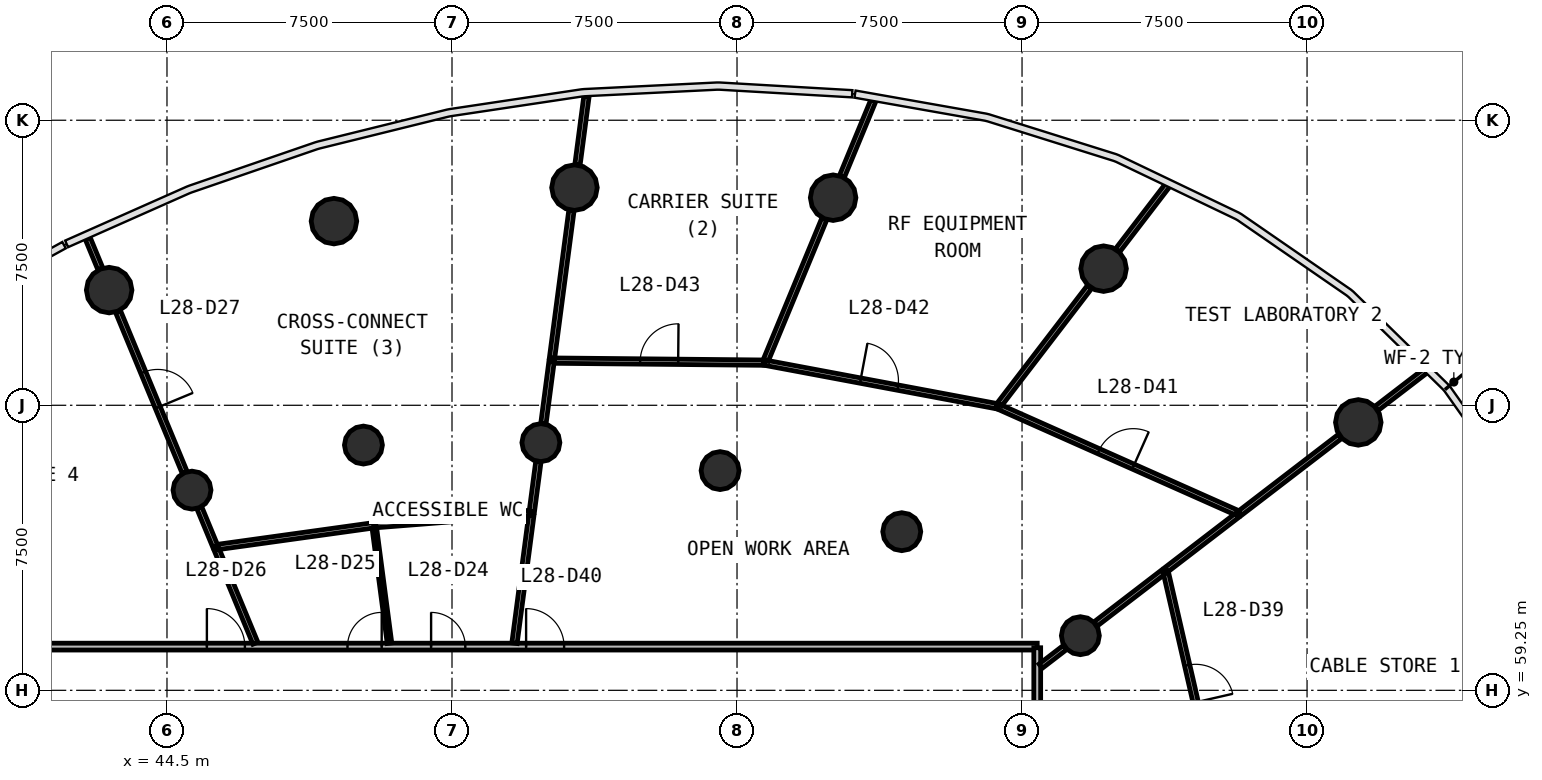
"""IFC4 building model, lengths in metres.
Left out: names, types, materials, properties, quantities, classifications, styles, units other than length and angle.
Written with IfcOpenShell. Run it as: python <this file> out.ifc"""

import sys

from ifc_helpers import new_model, si_unit, direction, frame, frame_2d, origin, origin_2d, place, context, subcontext, project, spatial, rectangle, circle, extrude, source, transform, mapped, element, fill, save


model = new_model("IFC4")
c1 = context("Model", 3, precision=1e-05, world=origin(), true_north=direction((0.0, 1.0)))
c2 = subcontext(c1, "Body", "Model", "MODEL_VIEW")
j1 = project(units=[si_unit("LENGTHUNIT", "METRE"), si_unit("PLANEANGLEUNIT", "RADIAN")], contexts=[c1])
p1 = place(None, origin())
s1 = spatial("IfcSite", under=j1, at=p1, CompositionType="ELEMENT")
p2 = place(p1, origin())
s2 = spatial("IfcBuilding", under=s1, at=p2, CompositionType="ELEMENT")
p3 = place(p2, frame((0.0, 0.0, 120.8)))
s3 = spatial("IfcBuildingStorey", under=s2, at=p3, CompositionType="ELEMENT", Elevation=120.8)
m1 = source(origin(), c2, "Body", "SweptSolid", [
    extrude(circle(Radius=0.6, at=origin_2d()), origin(), (0.0, 0.0, 1.0), 4.1),
])
for number, where, z_axis, x_axis in (
    (1, (75.848, 66.299, 0.0), (0.0, 0.0, 1.0), (1.0, 0.0, 0.0)),
    (2, (69.146, 70.345, 0.0), (0.0, 0.0, 1.0), (1.0, 0.0, 0.0)),
    (3, (62.029, 72.212, 0.0), (0.0, 0.0, 1.0), (1.0, 0.0, 0.0)),
    (4, (55.222, 72.477, 0.0), (0.0, 0.0, 1.0), (1.0, 0.0, 0.0)),
    (5, (48.894, 71.595, 0.0), (0.0, 0.0, 1.0), (1.0, 0.0, 0.0)),
    (6, (42.978, 69.781, 0.0), (0.0, 0.0, 1.0), (1.0, 0.0, 0.0)),
):
    element("IfcColumn", number, at=place(p3, frame(where, z_axis=z_axis, x_axis=x_axis)), inside=s3, PredefinedType="COLUMN", context=c2, shape_type="MappedRepresentation", body=[
        mapped(m1, transform((0.0, 0.0, 0.0), scale=1.0)),
    ])
m2 = source(origin(), c2, "Body", "SweptSolid", [
    extrude(circle(Radius=0.5, at=origin_2d()), origin(), (0.0, 0.0, 1.0), 4.1),
])
for number, where, z_axis, x_axis in (
    (7, (68.535, 60.688, 0.0), (0.0, 0.0, 1.0), (1.0, 0.0, 0.0)),
    (8, (63.835, 63.424, 0.0), (0.0, 0.0, 1.0), (1.0, 0.0, 0.0)),
    (9, (59.055, 65.031, 0.0), (0.0, 0.0, 1.0), (1.0, 0.0, 0.0)),
    (10, (54.339, 65.767, 0.0), (0.0, 0.0, 1.0), (1.0, 0.0, 0.0)),
    (11, (49.669, 65.703, 0.0), (0.0, 0.0, 1.0), (1.0, 0.0, 0.0)),
    (12, (45.158, 64.518, 0.0), (0.0, 0.0, 1.0), (1.0, 0.0, 0.0)),
):
    element("IfcColumn", number, at=place(p3, frame(where, z_axis=z_axis, x_axis=x_axis)), inside=s3, PredefinedType="COLUMN", context=c2, shape_type="MappedRepresentation", body=[
        mapped(m2, transform((0.0, 0.0, 0.0), scale=1.0)),
    ])
p4 = place(p3, frame((36.6, 60.4, 0.0), z_axis=(0.0, 0.0, 1.0), x_axis=(1.0, 0.0, 0.0)))
e13 = element("IfcWall", 13, at=p4, inside=s3, PredefinedType="PARTITIONING", context=c2, shape_type="SweptSolid", body=[
    extrude(rectangle(XDim=30.8, YDim=0.18, at=frame_2d((15.4, 0.0))), origin(), (0.0, 0.0, 1.0), 2.9),
])
p5 = place(p4, frame((14.85, 0.0, 0.0)))
e14 = element("IfcOpeningElement", 14, at=p5, cuts=e13, PredefinedType="OPENING", context=c2, shape_type="SweptSolid", body=[
    extrude(rectangle(XDim=0.9, YDim=2.1, at=frame_2d((0.45, 1.05))), frame((0.0, 0.1, 0.0), z_axis=(0.0, -1.0, 0.0), x_axis=(1.0, 0.0, 0.0)), (0.0, 0.0, 1.0), 0.2),
])
p6 = place(p4, frame((12.65, 0.0, 0.0)))
e15 = element("IfcOpeningElement", 15, at=p6, cuts=e13, PredefinedType="OPENING", context=c2, shape_type="SweptSolid", body=[
    extrude(rectangle(XDim=0.9, YDim=2.1, at=frame_2d((0.45, 1.05))), frame((0.0, 0.1, 0.0), z_axis=(0.0, -1.0, 0.0), x_axis=(1.0, 0.0, 0.0)), (0.0, 0.0, 1.0), 0.2),
])
p7 = place(p4, frame((8.95, 0.0, 0.0)))
e16 = element("IfcOpeningElement", 16, at=p7, cuts=e13, PredefinedType="OPENING", context=c2, shape_type="SweptSolid", body=[
    extrude(rectangle(XDim=1.0, YDim=2.1, at=frame_2d((0.5, 1.05))), frame((0.0, 0.1, 0.0), z_axis=(0.0, -1.0, 0.0), x_axis=(1.0, 0.0, 0.0)), (0.0, 0.0, 1.0), 0.2),
])
p8 = place(p4, frame((17.35, 0.0, 0.0)))
e17 = element("IfcOpeningElement", 17, at=p8, cuts=e13, PredefinedType="OPENING", context=c2, shape_type="SweptSolid", body=[
    extrude(rectangle(XDim=1.0, YDim=2.1, at=frame_2d((0.5, 1.05))), frame((0.0, 0.1, 0.0), z_axis=(0.0, -1.0, 0.0), x_axis=(1.0, 0.0, 0.0)), (0.0, 0.0, 1.0), 0.2),
])
p9 = place(p3, frame((67.4, 60.37, 0.0), z_axis=(0.0, 0.0, 1.0), x_axis=(0.0, -1.0, 0.0)))
e18 = element("IfcWall", 18, at=p9, inside=s3, PredefinedType="PARTITIONING", context=c2, shape_type="SweptSolid", body=[
    extrude(rectangle(XDim=23.583, YDim=0.18, at=frame_2d((11.791, 0.0))), origin(), (0.0, 0.0, 1.0), 2.9),
])
p10 = place(p9, frame((11.333, 0.0, 0.0)))
e19 = element("IfcOpeningElement", 19, at=p10, cuts=e18, PredefinedType="OPENING", context=c2, shape_type="SweptSolid", body=[
    extrude(rectangle(XDim=1.0, YDim=2.1, at=frame_2d((0.5, 1.05))), frame((0.0, 0.1, 0.0), z_axis=(0.0, -1.0, 0.0), x_axis=(1.0, 0.0, 0.0)), (0.0, 0.0, 1.0), 0.2),
])
p11 = place(p9, frame((9.133, 0.0, 0.0)))
e20 = element("IfcOpeningElement", 20, at=p11, cuts=e18, PredefinedType="OPENING", context=c2, shape_type="SweptSolid", body=[
    extrude(rectangle(XDim=1.0, YDim=2.1, at=frame_2d((0.5, 1.05))), frame((0.0, 0.1, 0.0), z_axis=(0.0, -1.0, 0.0), x_axis=(1.0, 0.0, 0.0)), (0.0, 0.0, 1.0), 0.2),
])
p12 = place(p3, frame((66.365, 66.721, 0.0), z_axis=(0.0, 0.0, 1.0), x_axis=(0.913647797107, -0.406506707006, 0.0)))
e21 = element("IfcWall", 21, at=p12, inside=s3, PredefinedType="PARTITIONING", context=c2, shape_type="SweptSolid", body=[
    extrude(rectangle(XDim=6.95, YDim=0.14, at=frame_2d((3.475, 0.0))), origin(), (0.0, 0.0, 1.0), 2.9),
])
p13 = place(p12, frame((2.9, 0.0, 0.0)))
e22 = element("IfcOpeningElement", 22, at=p13, cuts=e21, PredefinedType="OPENING", context=c2, shape_type="SweptSolid", body=[
    extrude(rectangle(XDim=1.0, YDim=2.1, at=frame_2d((0.5, 1.05))), frame((0.0, 0.08, 0.0), z_axis=(0.0, -1.0, 0.0), x_axis=(1.0, 0.0, 0.0)), (0.0, 0.0, 1.0), 0.16),
])
p14 = place(p3, frame((60.231, 67.872, 0.0), z_axis=(0.0, 0.0, 1.0), x_axis=(0.982845477165, -0.184430930205, 0.0)))
e23 = element("IfcWall", 23, at=p14, inside=s3, PredefinedType="PARTITIONING", context=c2, shape_type="SweptSolid", body=[
    extrude(rectangle(XDim=6.211, YDim=0.14, at=frame_2d((3.105, 0.0))), origin(), (0.0, 0.0, 1.0), 2.9),
])
p15 = place(p14, frame((2.561, 0.0, 0.0)))
e24 = element("IfcOpeningElement", 24, at=p15, cuts=e23, PredefinedType="OPENING", context=c2, shape_type="SweptSolid", body=[
    extrude(rectangle(XDim=1.0, YDim=2.1, at=frame_2d((0.5, 1.05))), frame((0.0, 0.08, 0.0), z_axis=(0.0, -1.0, 0.0), x_axis=(1.0, 0.0, 0.0)), (0.0, 0.0, 1.0), 0.16),
])
p16 = place(p3, frame((70.772, 62.404, 0.0), z_axis=(0.0, 0.0, 1.0), x_axis=(0.223963615519, -0.974597506114, 0.0)))
e25 = element("IfcWall", 25, at=p16, inside=s3, PredefinedType="PARTITIONING", context=c2, shape_type="SweptSolid", body=[
    extrude(rectangle(XDim=6.21, YDim=0.14, at=frame_2d((3.105, 0.0))), origin(), (0.0, 0.0, 1.0), 2.9),
])
p17 = place(p16, frame((2.56, 0.0, 0.0)))
e26 = element("IfcOpeningElement", 26, at=p17, cuts=e25, PredefinedType="OPENING", context=c2, shape_type="SweptSolid", body=[
    extrude(rectangle(XDim=1.0, YDim=2.1, at=frame_2d((0.5, 1.05))), frame((0.0, 0.08, 0.0), z_axis=(0.0, -1.0, 0.0), x_axis=(1.0, 0.0, 0.0)), (0.0, 0.0, 1.0), 0.16),
])
p18 = place(p3, frame((54.623, 67.925, 0.0), z_axis=(0.0, 0.0, 1.0), x_axis=(0.999954062226, -0.009585063231, 0.0)))
e27 = element("IfcWall", 27, at=p18, inside=s3, PredefinedType="PARTITIONING", context=c2, shape_type="SweptSolid", body=[
    extrude(rectangle(XDim=5.578, YDim=0.14, at=frame_2d((2.789, 0.0))), origin(), (0.0, 0.0, 1.0), 2.9),
])
p19 = place(p18, frame((2.328, 0.0, 0.0)))
e28 = element("IfcOpeningElement", 28, at=p19, cuts=e27, PredefinedType="OPENING", context=c2, shape_type="SweptSolid", body=[
    extrude(rectangle(XDim=1.0, YDim=2.1, at=frame_2d((0.5, 1.05))), frame((0.0, 0.08, 0.0), z_axis=(0.0, -1.0, 0.0), x_axis=(1.0, 0.0, 0.0)), (0.0, 0.0, 1.0), 0.16),
])
p20 = place(p3, frame((43.21, 69.222, 0.0), z_axis=(0.0, 0.0, 1.0), x_axis=(0.382705930348, -0.923870213221, 0.0)))
e29 = element("IfcWall", 29, at=p20, inside=s3, PredefinedType="PARTITIONING", context=c2, shape_type="SweptSolid", body=[
    extrude(rectangle(XDim=4.587, YDim=0.14, at=frame_2d((2.293, 0.0))), origin(), (0.0, 0.0, 1.0), 2.9),
])
p21 = place(p20, frame((1.737, 0.0, 0.0)))
e30 = element("IfcOpeningElement", 30, at=p21, cuts=e29, PredefinedType="OPENING", context=c2, shape_type="SweptSolid", body=[
    extrude(rectangle(XDim=1.0, YDim=2.1, at=frame_2d((0.5, 1.05))), frame((0.0, 0.08, 0.0), z_axis=(0.0, -1.0, 0.0), x_axis=(1.0, 0.0, 0.0)), (0.0, 0.0, 1.0), 0.16),
])
p22 = place(p3, frame((49.947, 63.593, 0.0), z_axis=(0.0, 0.0, 1.0), x_axis=(-0.990459508441, -0.137804071561, 0.0)))
e31 = element("IfcWall", 31, at=p22, inside=s3, PredefinedType="PARTITIONING", context=c2, shape_type="SweptSolid", body=[
    extrude(rectangle(XDim=4.206, YDim=0.14, at=frame_2d((2.103, 0.0))), origin(), (0.0, 0.0, 1.0), 2.9),
])
p23 = place(p3, frame((54.096, 63.92, 0.0), z_axis=(0.0, 0.0, 1.0), x_axis=(-0.996907048468, -0.078589673076, 0.0)))
e32 = element("IfcWall", 32, at=p23, inside=s3, PredefinedType="PARTITIONING", context=c2, shape_type="SweptSolid", body=[
    extrude(rectangle(XDim=4.132, YDim=0.14, at=frame_2d((2.066, 0.0))), origin(), (0.0, 0.0, 1.0), 2.9),
])
p24 = place(p3, frame((60.258, 67.938, 0.0), z_axis=(0.0, 0.0, 1.0), x_axis=(0.382718123952, 0.923865162022, 0.0)))
e33 = element("IfcWall", 33, at=p24, inside=s3, PredefinedType="PARTITIONING", context=c2, shape_type="SweptSolid", body=[
    extrude(rectangle(XDim=4.022, YDim=0.14, at=frame_2d((2.011, 0.0))), origin(), (0.0, 0.0, 1.0), 2.9),
])
p25 = place(p3, frame((54.632, 67.995, 0.0), z_axis=(0.0, 0.0, 1.0), x_axis=(0.130554504695, 0.991441133554, 0.0)))
e34 = element("IfcWall", 34, at=p25, inside=s3, PredefinedType="PARTITIONING", context=c2, shape_type="SweptSolid", body=[
    extrude(rectangle(XDim=3.916, YDim=0.14, at=frame_2d((1.958, 0.0))), origin(), (0.0, 0.0, 1.0), 2.9),
])
p26 = place(p3, frame((66.409, 66.778, 0.0), z_axis=(0.0, 0.0, 1.0), x_axis=(0.608715955057, 0.793388231611, 0.0)))
e35 = element("IfcWall", 35, at=p26, inside=s3, PredefinedType="PARTITIONING", context=c2, shape_type="SweptSolid", body=[
    extrude(rectangle(XDim=3.892, YDim=0.14, at=frame_2d((1.946, 0.0))), origin(), (0.0, 0.0, 1.0), 2.9),
])
p27 = place(p3, frame((53.644, 60.49, 0.0), z_axis=(0.0, 0.0, 1.0), x_axis=(0.130568214448, 0.991439328137, 0.0)))
e36 = element("IfcWall", 36, at=p27, inside=s3, PredefinedType="PARTITIONING", context=c2, shape_type="SweptSolid", body=[
    extrude(rectangle(XDim=3.388, YDim=0.14, at=frame_2d((1.694, 0.0))), origin(), (0.0, 0.0, 1.0), 2.9),
])
p28 = place(p3, frame((72.739, 63.914, 0.0), z_axis=(0.0, 0.0, 1.0), x_axis=(0.793376329811, 0.608731467312, 0.0)))
e37 = element("IfcWall", 37, at=p28, inside=s3, PredefinedType="PARTITIONING", context=c2, shape_type="SweptSolid", body=[
    extrude(rectangle(XDim=3.315, YDim=0.14, at=frame_2d((1.657, 0.0))), origin(), (0.0, 0.0, 1.0), 2.9),
])
p29 = place(p3, frame((46.826, 60.49, 0.0), z_axis=(0.0, 0.0, 1.0), x_axis=(-0.382665323853, 0.923887033094, 0.0)))
e38 = element("IfcWall", 38, at=p29, inside=s3, PredefinedType="PARTITIONING", context=c2, shape_type="SweptSolid", body=[
    extrude(rectangle(XDim=2.659, YDim=0.14, at=frame_2d((1.33, 0.0))), origin(), (0.0, 0.0, 1.0), 2.9),
])
p30 = place(p3, frame((70.796, 62.422, 0.0), z_axis=(0.0, 0.0, 1.0), x_axis=(0.79335268966, 0.608762276927, 0.0)))
e39 = element("IfcWall", 39, at=p30, inside=s3, PredefinedType="PARTITIONING", context=c2, shape_type="SweptSolid", body=[
    extrude(rectangle(XDim=2.34, YDim=0.14, at=frame_2d((1.17, 0.0))), origin(), (0.0, 0.0, 1.0), 2.9),
])
p31 = place(p3, frame((68.935, 60.995, 0.0), z_axis=(0.0, 0.0, 1.0), x_axis=(0.793288498534, 0.608845923115, 0.0)))
e40 = element("IfcWall", 40, at=p31, inside=s3, PredefinedType="PARTITIONING", context=c2, shape_type="SweptSolid", body=[
    extrude(rectangle(XDim=2.238, YDim=0.14, at=frame_2d((1.119, 0.0))), origin(), (0.0, 0.0, 1.0), 2.9),
])
p32 = place(p3, frame((69.514, 70.824, 0.0), z_axis=(0.0, 0.0, 1.0), x_axis=(0.608790940556, 0.793330694412, 0.0)))
e41 = element("IfcWall", 41, at=p32, inside=s3, PredefinedType="PARTITIONING", context=c2, shape_type="SweptSolid", body=[
    extrude(rectangle(XDim=2.182, YDim=0.14, at=frame_2d((1.091, 0.0))), origin(), (0.0, 0.0, 1.0), 2.9),
])
p33 = place(p3, frame((62.26, 72.771, 0.0), z_axis=(0.0, 0.0, 1.0), x_axis=(0.38271416586, 0.923866801682, 0.0)))
e42 = element("IfcWall", 42, at=p33, inside=s3, PredefinedType="PARTITIONING", context=c2, shape_type="SweptSolid", body=[
    extrude(rectangle(XDim=2.162, YDim=0.14, at=frame_2d((1.081, 0.0))), origin(), (0.0, 0.0, 1.0), 2.9),
])
p34 = place(p3, frame((55.301, 73.076, 0.0), z_axis=(0.0, 0.0, 1.0), x_axis=(0.13060094235, 0.991435017466, 0.0)))
e43 = element("IfcWall", 43, at=p34, inside=s3, PredefinedType="PARTITIONING", context=c2, shape_type="SweptSolid", body=[
    extrude(rectangle(XDim=1.812, YDim=0.14, at=frame_2d((0.906, 0.0))), origin(), (0.0, 0.0, 1.0), 2.9),
])
p35 = place(p3, frame((54.405, 66.267, 0.0), z_axis=(0.0, 0.0, 1.0), x_axis=(0.130508343522, 0.991447211036, 0.0)))
e44 = element("IfcWall", 44, at=p35, inside=s3, PredefinedType="PARTITIONING", context=c2, shape_type="SweptSolid", body=[
    extrude(rectangle(XDim=1.643, YDim=0.14, at=frame_2d((0.821, 0.0))), origin(), (0.0, 0.0, 1.0), 2.9),
])
p36 = place(p3, frame((76.328, 66.667, 0.0), z_axis=(0.0, 0.0, 1.0), x_axis=(0.793358091605, 0.608755236925, 0.0)))
e45 = element("IfcWall", 45, at=p36, inside=s3, PredefinedType="PARTITIONING", context=c2, shape_type="SweptSolid", body=[
    extrude(rectangle(XDim=1.631, YDim=0.14, at=frame_2d((0.815, 0.0))), origin(), (0.0, 0.0, 1.0), 2.9),
])
p37 = place(p3, frame((54.1, 63.95, 0.0), z_axis=(0.0, 0.0, 1.0), x_axis=(0.130478281576, 0.991451167752, 0.0)))
e46 = element("IfcWall", 46, at=p37, inside=s3, PredefinedType="PARTITIONING", context=c2, shape_type="SweptSolid", body=[
    extrude(rectangle(XDim=1.329, YDim=0.14, at=frame_2d((0.664, 0.0))), origin(), (0.0, 0.0, 1.0), 2.9),
])
p38 = place(p3, frame((45.77, 63.041, 0.0), z_axis=(0.0, 0.0, 1.0), x_axis=(-0.382647721552, 0.923894323606, 0.0)))
e47 = element("IfcWall", 47, at=p38, inside=s3, PredefinedType="PARTITIONING", context=c2, shape_type="SweptSolid", body=[
    extrude(rectangle(XDim=1.093, YDim=0.14, at=frame_2d((0.546, 0.0))), origin(), (0.0, 0.0, 1.0), 2.9),
])
p39 = place(p3, frame((67.49, 59.886, 0.0), z_axis=(0.0, 0.0, 1.0), x_axis=(0.793316076519, 0.608809989025, 0.0)))
e48 = element("IfcWall", 48, at=p39, inside=s3, PredefinedType="PARTITIONING", context=c2, shape_type="SweptSolid", body=[
    extrude(rectangle(XDim=0.812, YDim=0.14, at=frame_2d((0.406, 0.0))), origin(), (0.0, 0.0, 1.0), 2.9),
])
p40 = place(p3, frame((42.747, 70.34, 0.0), z_axis=(0.0, 0.0, 1.0), x_axis=(-0.382764243687, 0.923846055225, 0.0)))
e49 = element("IfcWall", 49, at=p40, inside=s3, PredefinedType="PARTITIONING", context=c2, shape_type="SweptSolid", body=[
    extrude(rectangle(XDim=0.871, YDim=0.14, at=frame_2d((0.436, 0.0))), origin(), (0.0, 0.0, 1.0), 2.9),
])
p41 = place(p3, frame((50.356, 60.49, 0.0), z_axis=(0.0, 0.0, 1.0), x_axis=(-0.130532942165, 0.991443972703, 0.0)))
e50 = element("IfcWall", 50, at=p41, inside=s3, PredefinedType="PARTITIONING", context=c2, shape_type="SweptSolid", body=[
    extrude(rectangle(XDim=3.06, YDim=0.12, at=frame_2d((1.53, 0.0))), origin(), (0.0, 0.0, 1.0), 2.9),
])
m3 = source(origin(), c2, "Body", "SweptSolid", [
    extrude(rectangle(XDim=0.9, YDim=2.1, at=frame_2d((0.45, 1.05))), frame((0.0, 0.025, 0.0), z_axis=(0.0, -1.0, 0.0), x_axis=(1.0, 0.0, 0.0)), (0.0, 0.0, 1.0), 0.05),
])
p42 = place(p5, origin())
e51 = element("IfcDoor", 51, at=p42, inside=s3, OperationType="SINGLE_SWING_LEFT", PredefinedType="DOOR", context=c2, shape_type="MappedRepresentation", body=[
    mapped(m3, transform((0.0, 0.0, 0.0), scale=1.0)),
])
fill(e14, e51)
p43 = place(p6, origin())
e52 = element("IfcDoor", 52, at=p43, inside=s3, OperationType="SINGLE_SWING_RIGHT", PredefinedType="DOOR", context=c2, shape_type="MappedRepresentation", body=[
    mapped(m3, transform((0.0, 0.0, 0.0), scale=1.0)),
])
fill(e15, e52)
m4 = source(origin(), c2, "Body", "SweptSolid", [
    extrude(rectangle(XDim=1.0, YDim=2.1, at=frame_2d((0.5, 1.05))), frame((0.0, 0.025, 0.0), z_axis=(0.0, -1.0, 0.0), x_axis=(1.0, 0.0, 0.0)), (0.0, 0.0, 1.0), 0.05),
])
p44 = place(p7, origin())
e53 = element("IfcDoor", 53, at=p44, inside=s3, OperationType="SINGLE_SWING_LEFT", PredefinedType="DOOR", context=c2, shape_type="MappedRepresentation", body=[
    mapped(m4, transform((0.0, 0.0, 0.0), scale=1.0)),
])
fill(e16, e53)
p45 = place(p21, origin())
e54 = element("IfcDoor", 54, at=p45, inside=s3, OperationType="SINGLE_SWING_RIGHT", PredefinedType="DOOR", context=c2, shape_type="MappedRepresentation", body=[
    mapped(m4, transform((0.0, 0.0, 0.0), scale=1.0)),
])
fill(e30, e54)
p46 = place(p17, origin())
e55 = element("IfcDoor", 55, at=p46, inside=s3, OperationType="SINGLE_SWING_RIGHT", PredefinedType="DOOR", context=c2, shape_type="MappedRepresentation", body=[
    mapped(m4, transform((0.0, 0.0, 0.0), scale=1.0)),
])
fill(e26, e55)
p47 = place(p8, origin())
e56 = element("IfcDoor", 56, at=p47, inside=s3, OperationType="SINGLE_SWING_LEFT", PredefinedType="DOOR", context=c2, shape_type="MappedRepresentation", body=[
    mapped(m4, transform((0.0, 0.0, 0.0), scale=1.0)),
])
fill(e17, e56)
p48 = place(p13, origin())
e57 = element("IfcDoor", 57, at=p48, inside=s3, OperationType="SINGLE_SWING_RIGHT", PredefinedType="DOOR", context=c2, shape_type="MappedRepresentation", body=[
    mapped(m4, transform((0.0, 0.0, 0.0), scale=1.0)),
])
fill(e22, e57)
p49 = place(p15, origin())
e58 = element("IfcDoor", 58, at=p49, inside=s3, OperationType="SINGLE_SWING_LEFT", PredefinedType="DOOR", context=c2, shape_type="MappedRepresentation", body=[
    mapped(m4, transform((0.0, 0.0, 0.0), scale=1.0)),
])
fill(e24, e58)
p50 = place(p19, origin())
e59 = element("IfcDoor", 59, at=p50, inside=s3, OperationType="SINGLE_SWING_RIGHT", PredefinedType="DOOR", context=c2, shape_type="MappedRepresentation", body=[
    mapped(m4, transform((0.0, 0.0, 0.0), scale=1.0)),
])
fill(e28, e59)
save(model, sys.argv[1])
